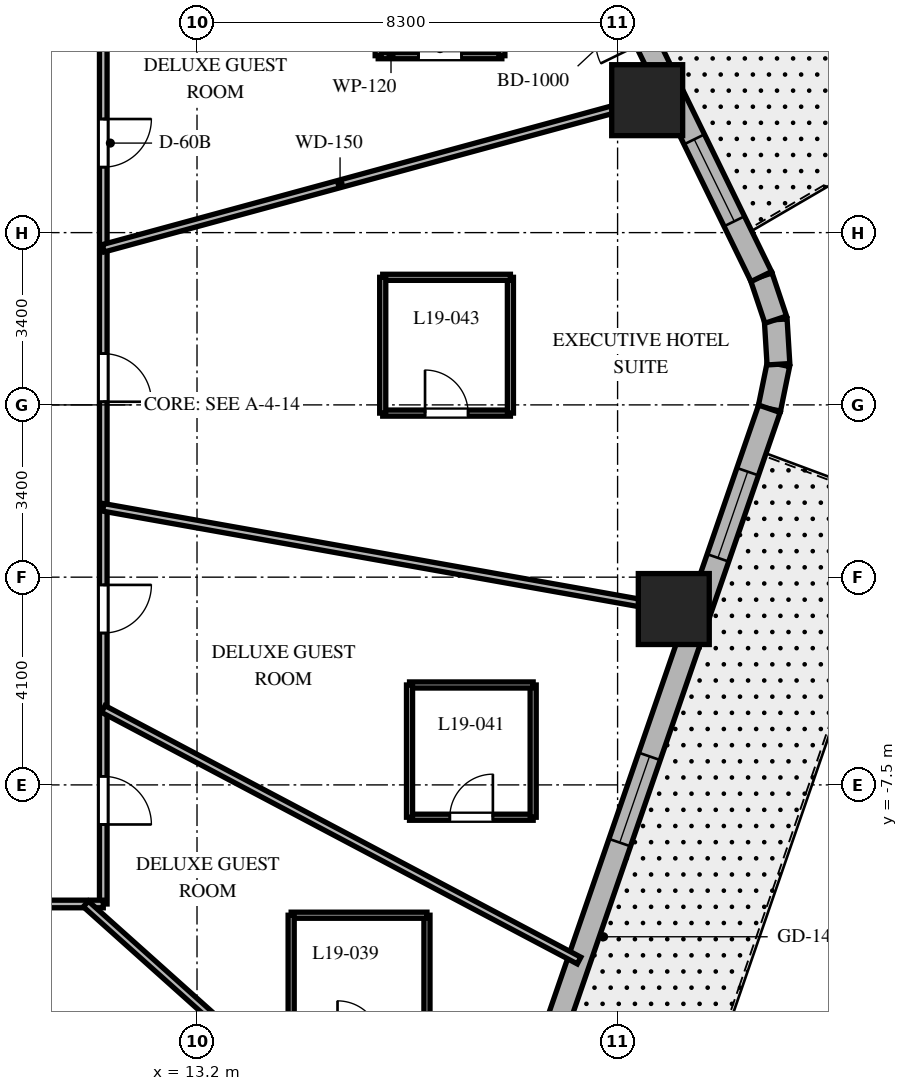
"""IFC4 building model, lengths in metres.
Left out: names, types, materials, properties, quantities, classifications, styles, units other than length and angle.
Written with IfcOpenShell. Run it as: python <this file> out.ifc"""

import sys

from ifc_helpers import new_model, si_unit, direction, frame, frame_2d, origin, origin_2d, place, context, subcontext, project, spatial, rectangle, extrude, element, fill, save


model = new_model("IFC4")
c1 = context("Model", 3, precision=1e-05, world=origin(), true_north=direction((0.0, 1.0)))
c2 = subcontext(c1, "Body", "Model", "MODEL_VIEW")
j1 = project(units=[si_unit("LENGTHUNIT", "METRE"), si_unit("PLANEANGLEUNIT", "RADIAN")], contexts=[c1])
p1 = place(None, origin())
s1 = spatial("IfcSite", under=j1, at=p1, CompositionType="ELEMENT")
p2 = place(p1, origin())
s2 = spatial("IfcBuilding", under=s1, at=p2, CompositionType="ELEMENT")
p3 = place(p2, frame((0.0, 0.0, 82.3)))
s3 = spatial("IfcBuildingStorey", under=s2, at=p3, CompositionType="ELEMENT", Elevation=82.3)
for number, where, z_axis, x_axis in (
    (1, (22.609, -4.029, 0.0), (0.0, 0.0, 1.0), (1.0, 0.0, 0.0)),
    (2, (22.084, 6.014, 0.0), (0.0, 0.0, 1.0), (1.0, 0.0, 0.0)),
):
    element("IfcColumn", number, at=place(p3, frame(where, z_axis=z_axis, x_axis=x_axis)), inside=s3, PredefinedType="COLUMN", context=c2, shape_type="SweptSolid", body=[
        extrude(rectangle(XDim=1.4, YDim=1.4, at=origin_2d()), origin(), (0.0, 0.0, 1.0), 3.7),
    ])
p4 = place(p3, frame((24.496, -0.077, 0.0), z_axis=(0.0, 0.0, 1.0), x_axis=(0.199570594521, 0.979883451132, 0.0)))
e3 = element("IfcWall", 3, at=p4, inside=s3, PredefinedType="SOLIDWALL", context=c2, shape_type="SweptSolid", body=[
    extrude(rectangle(XDim=0.897, YDim=0.45, at=frame_2d((0.448, 0.0))), origin(), (0.0, 0.0, 1.0), 3.38),
])
p5 = place(p3, frame((24.675, 0.802, 0.0), z_axis=(0.0, 0.0, 1.0), x_axis=(-0.061188874166, 0.998126205286, 0.0)))
e4 = element("IfcWall", 4, at=p5, inside=s3, PredefinedType="SOLIDWALL", context=c2, shape_type="SweptSolid", body=[
    extrude(rectangle(XDim=0.882, YDim=0.45, at=frame_2d((0.441, 0.0))), origin(), (0.0, 0.0, 1.0), 3.38),
])
p6 = place(p3, frame((24.621, 1.682, 0.0), z_axis=(0.0, 0.0, 1.0), x_axis=(-0.317697451681, 0.948192137278, 0.0)))
e5 = element("IfcWall", 5, at=p6, inside=s3, PredefinedType="SOLIDWALL", context=c2, shape_type="SweptSolid", body=[
    extrude(rectangle(XDim=0.897, YDim=0.45, at=frame_2d((0.448, 0.0))), origin(), (0.0, 0.0, 1.0), 3.38),
])
p7 = place(p3, frame((17.39, -20.678, 0.0), z_axis=(0.0, 0.0, 1.0), x_axis=(0.326068018294, 0.945346310854, 0.0)))
e6 = element("IfcWall", 6, at=p7, inside=s3, PredefinedType="SOLIDWALL", context=c2, shape_type="SweptSolid", body=[
    extrude(rectangle(XDim=21.793, YDim=0.45, at=frame_2d((10.896, 0.0))), origin(), (0.0, 0.0, 1.0), 3.38),
])
p8 = place(p7, frame((5.493, 0.0, 0.0)))
e7 = element("IfcOpeningElement", 7, at=p8, cuts=e6, PredefinedType="OPENING", context=c2, shape_type="SweptSolid", body=[
    extrude(rectangle(XDim=0.95, YDim=2.15, at=frame_2d((0.475, 1.075))), frame((0.0, 0.235, 0.0), z_axis=(0.0, -1.0, 0.0), x_axis=(1.0, 0.0, 0.0)), (0.0, 0.0, 1.0), 0.47),
])
p9 = place(p7, frame((1.26, 0.0, 0.8)))
e8 = element("IfcOpeningElement", 8, at=p9, cuts=e6, PredefinedType="OPENING", context=c2, shape_type="SweptSolid", body=[
    extrude(rectangle(XDim=1.8, YDim=1.8, at=frame_2d((0.9, 0.9))), frame((0.0, 0.235, 0.0), z_axis=(0.0, -1.0, 0.0), x_axis=(1.0, 0.0, 0.0)), (0.0, 0.0, 1.0), 0.47),
])
p10 = place(p7, frame((7.283, 0.0, 0.8)))
e9 = element("IfcOpeningElement", 9, at=p10, cuts=e6, PredefinedType="OPENING", context=c2, shape_type="SweptSolid", body=[
    extrude(rectangle(XDim=1.8, YDim=1.8, at=frame_2d((0.9, 0.9))), frame((0.0, 0.235, 0.0), z_axis=(0.0, -1.0, 0.0), x_axis=(1.0, 0.0, 0.0)), (0.0, 0.0, 1.0), 0.47),
])
p11 = place(p7, frame((12.736, 0.0, 0.8)))
e10 = element("IfcOpeningElement", 10, at=p11, cuts=e6, PredefinedType="OPENING", context=c2, shape_type="SweptSolid", body=[
    extrude(rectangle(XDim=1.8, YDim=1.8, at=frame_2d((0.9, 0.9))), frame((0.0, 0.235, 0.0), z_axis=(0.0, -1.0, 0.0), x_axis=(1.0, 0.0, 0.0)), (0.0, 0.0, 1.0), 0.47),
])
p12 = place(p7, frame((18.68, 0.0, 0.8)))
e11 = element("IfcOpeningElement", 11, at=p12, cuts=e6, PredefinedType="OPENING", context=c2, shape_type="SweptSolid", body=[
    extrude(rectangle(XDim=1.8, YDim=1.8, at=frame_2d((0.9, 0.9))), frame((0.0, 0.235, 0.0), z_axis=(0.0, -1.0, 0.0), x_axis=(1.0, 0.0, 0.0)), (0.0, 0.0, 1.0), 0.47),
])
p13 = place(p3, frame((24.336, 2.532, 0.0), z_axis=(0.0, 0.0, 1.0), x_axis=(-0.438931326393, 0.898520612291, 0.0)))
e12 = element("IfcWall", 12, at=p13, inside=s3, PredefinedType="SOLIDWALL", context=c2, shape_type="SweptSolid", body=[
    extrude(rectangle(XDim=20.623, YDim=0.45, at=frame_2d((10.312, 0.0))), origin(), (0.0, 0.0, 1.0), 3.38),
])
p14 = place(p13, frame((5.171, 0.0, 0.0)))
e13 = element("IfcOpeningElement", 13, at=p14, cuts=e12, PredefinedType="OPENING", context=c2, shape_type="SweptSolid", body=[
    extrude(rectangle(XDim=1.0, YDim=2.15, at=frame_2d((0.5, 1.075))), frame((0.0, 0.235, 0.0), z_axis=(0.0, -1.0, 0.0), x_axis=(1.0, 0.0, 0.0)), (0.0, 0.0, 1.0), 0.47),
])
p15 = place(p13, frame((6.842, 0.0, 0.8)))
e14 = element("IfcOpeningElement", 14, at=p15, cuts=e12, PredefinedType="OPENING", context=c2, shape_type="SweptSolid", body=[
    extrude(rectangle(XDim=1.8, YDim=1.8, at=frame_2d((0.9, 0.9))), frame((0.0, 0.235, 0.0), z_axis=(0.0, -1.0, 0.0), x_axis=(1.0, 0.0, 0.0)), (0.0, 0.0, 1.0), 0.47),
])
p16 = place(p13, frame((12.683, 0.0, 0.8)))
e15 = element("IfcOpeningElement", 15, at=p16, cuts=e12, PredefinedType="OPENING", context=c2, shape_type="SweptSolid", body=[
    extrude(rectangle(XDim=1.8, YDim=1.8, at=frame_2d((0.9, 0.9))), frame((0.0, 0.235, 0.0), z_axis=(0.0, -1.0, 0.0), x_axis=(1.0, 0.0, 0.0)), (0.0, 0.0, 1.0), 0.47),
])
p17 = place(p13, frame((17.66, 0.0, 0.8)))
e16 = element("IfcOpeningElement", 16, at=p17, cuts=e12, PredefinedType="OPENING", context=c2, shape_type="SweptSolid", body=[
    extrude(rectangle(XDim=1.8, YDim=1.8, at=frame_2d((0.9, 0.9))), frame((0.0, 0.235, 0.0), z_axis=(0.0, -1.0, 0.0), x_axis=(1.0, 0.0, 0.0)), (0.0, 0.0, 1.0), 0.47),
])
p18 = place(p13, frame((1.214, 0.0, 0.8)))
e17 = element("IfcOpeningElement", 17, at=p18, cuts=e12, PredefinedType="OPENING", context=c2, shape_type="SweptSolid", body=[
    extrude(rectangle(XDim=1.8, YDim=1.8, at=frame_2d((0.9, 0.9))), frame((0.0, 0.235, 0.0), z_axis=(0.0, -1.0, 0.0), x_axis=(1.0, 0.0, 0.0)), (0.0, 0.0, 1.0), 0.47),
])
p19 = place(p3, frame((11.35, 9.85, 0.0), z_axis=(0.0, 0.0, 1.0), x_axis=(0.0, -1.0, 0.0)))
e18 = element("IfcWall", 18, at=p19, inside=s3, PredefinedType="PARTITIONING", context=c2, shape_type="SweptSolid", body=[
    extrude(rectangle(XDim=19.7, YDim=0.15, at=frame_2d((9.85, 0.0))), origin(), (0.0, 0.0, 1.0), 2.82),
])
p20 = place(p19, frame((4.208, 0.0, 0.0)))
e19 = element("IfcOpeningElement", 19, at=p20, cuts=e18, PredefinedType="OPENING", context=c2, shape_type="SweptSolid", body=[
    extrude(rectangle(XDim=0.95, YDim=2.03, at=frame_2d((0.475, 1.015))), frame((0.0, 0.085, 0.0), z_axis=(0.0, -1.0, 0.0), x_axis=(1.0, 0.0, 0.0)), (0.0, 0.0, 1.0), 0.17),
])
p21 = place(p19, frame((0.97, 0.0, 0.0)))
e20 = element("IfcOpeningElement", 20, at=p21, cuts=e18, PredefinedType="OPENING", context=c2, shape_type="SweptSolid", body=[
    extrude(rectangle(XDim=0.95, YDim=2.03, at=frame_2d((0.475, 1.015))), frame((0.0, 0.085, 0.0), z_axis=(0.0, -1.0, 0.0), x_axis=(1.0, 0.0, 0.0)), (0.0, 0.0, 1.0), 0.17),
])
p22 = place(p19, frame((17.181, 0.0, 0.0)))
e21 = element("IfcOpeningElement", 21, at=p22, cuts=e18, PredefinedType="OPENING", context=c2, shape_type="SweptSolid", body=[
    extrude(rectangle(XDim=0.95, YDim=2.03, at=frame_2d((0.475, 1.015))), frame((0.0, 0.085, 0.0), z_axis=(0.0, -1.0, 0.0), x_axis=(1.0, 0.0, 0.0)), (0.0, 0.0, 1.0), 0.17),
])
p23 = place(p19, frame((13.403, 0.0, 0.0)))
e22 = element("IfcOpeningElement", 22, at=p23, cuts=e18, PredefinedType="OPENING", context=c2, shape_type="SweptSolid", body=[
    extrude(rectangle(XDim=0.95, YDim=2.03, at=frame_2d((0.475, 1.015))), frame((0.0, 0.085, 0.0), z_axis=(0.0, -1.0, 0.0), x_axis=(1.0, 0.0, 0.0)), (0.0, 0.0, 1.0), 0.17),
])
p24 = place(p19, frame((8.838, 0.0, 0.0)))
e23 = element("IfcOpeningElement", 23, at=p24, cuts=e18, PredefinedType="OPENING", context=c2, shape_type="SweptSolid", body=[
    extrude(rectangle(XDim=0.95, YDim=2.03, at=frame_2d((0.475, 1.015))), frame((0.0, 0.085, 0.0), z_axis=(0.0, -1.0, 0.0), x_axis=(1.0, 0.0, 0.0)), (0.0, 0.0, 1.0), 0.17),
])
p25 = place(p3, frame((11.35, -9.85, 0.0), z_axis=(0.0, 0.0, 1.0), x_axis=(-1.0, 0.0, 0.0)))
e24 = element("IfcWall", 24, at=p25, inside=s3, PredefinedType="PARTITIONING", context=c2, shape_type="SweptSolid", body=[
    extrude(rectangle(XDim=22.7, YDim=0.15, at=frame_2d((11.35, 0.0))), origin(), (0.0, 0.0, 1.0), 2.82),
])
p26 = place(p25, frame((18.837, 0.0, 0.0)))
e25 = element("IfcOpeningElement", 25, at=p26, cuts=e24, PredefinedType="OPENING", context=c2, shape_type="SweptSolid", body=[
    extrude(rectangle(XDim=0.9, YDim=2.03, at=frame_2d((0.45, 1.015))), frame((0.0, 0.085, 0.0), z_axis=(0.0, -1.0, 0.0), x_axis=(1.0, 0.0, 0.0)), (0.0, 0.0, 1.0), 0.17),
])
p27 = place(p25, frame((15.532, 0.0, 0.0)))
e26 = element("IfcOpeningElement", 26, at=p27, cuts=e24, PredefinedType="OPENING", context=c2, shape_type="SweptSolid", body=[
    extrude(rectangle(XDim=0.95, YDim=2.03, at=frame_2d((0.475, 1.015))), frame((0.0, 0.085, 0.0), z_axis=(0.0, -1.0, 0.0), x_axis=(1.0, 0.0, 0.0)), (0.0, 0.0, 1.0), 0.17),
])
p28 = place(p25, frame((10.444, 0.0, 0.0)))
e27 = element("IfcOpeningElement", 27, at=p28, cuts=e24, PredefinedType="OPENING", context=c2, shape_type="SweptSolid", body=[
    extrude(rectangle(XDim=0.95, YDim=2.03, at=frame_2d((0.475, 1.015))), frame((0.0, 0.085, 0.0), z_axis=(0.0, -1.0, 0.0), x_axis=(1.0, 0.0, 0.0)), (0.0, 0.0, 1.0), 0.17),
])
p29 = place(p25, frame((3.369, 0.0, 0.0)))
e28 = element("IfcOpeningElement", 28, at=p29, cuts=e24, PredefinedType="OPENING", context=c2, shape_type="SweptSolid", body=[
    extrude(rectangle(XDim=0.95, YDim=2.03, at=frame_2d((0.475, 1.015))), frame((0.0, 0.085, 0.0), z_axis=(0.0, -1.0, 0.0), x_axis=(1.0, 0.0, 0.0)), (0.0, 0.0, 1.0), 0.17),
])
p30 = place(p3, frame((11.35, 3.091, 0.0), z_axis=(0.0, 0.0, 1.0), x_axis=(0.964859685283, 0.262765651704, 0.0)))
e29 = element("IfcWall", 29, at=p30, inside=s3, PredefinedType="PARTITIONING", context=c2, shape_type="SweptSolid", body=[
    extrude(rectangle(XDim=11.629, YDim=0.15, at=frame_2d((5.814, 0.0))), origin(), (0.0, 0.0, 1.0), 2.52),
])
p31 = place(p3, frame((11.007, -9.85, 0.0), z_axis=(0.0, 0.0, 1.0), x_axis=(0.745177305978, -0.666866390407, 0.0)))
e30 = element("IfcWall", 30, at=p31, inside=s3, PredefinedType="PARTITIONING", context=c2, shape_type="SweptSolid", body=[
    extrude(rectangle(XDim=10.375, YDim=0.15, at=frame_2d((5.188, 0.0))), origin(), (0.0, 0.0, 1.0), 2.52),
])
p32 = place(p3, frame((11.35, -6.001, 0.0), z_axis=(0.0, 0.0, 1.0), x_axis=(0.884022077319, -0.467445148453, 0.0)))
e31 = element("IfcWall", 31, at=p32, inside=s3, PredefinedType="PARTITIONING", context=c2, shape_type="SweptSolid", body=[
    extrude(rectangle(XDim=10.621, YDim=0.15, at=frame_2d((5.311, 0.0))), origin(), (0.0, 0.0, 1.0), 2.52),
])
p33 = place(p3, frame((11.35, -2.023, 0.0), z_axis=(0.0, 0.0, 1.0), x_axis=(0.984493741877, -0.17541970301, 0.0)))
e32 = element("IfcWall", 32, at=p33, inside=s3, PredefinedType="PARTITIONING", context=c2, shape_type="SweptSolid", body=[
    extrude(rectangle(XDim=11.937, YDim=0.15, at=frame_2d((5.969, 0.0))), origin(), (0.0, 0.0, 1.0), 2.52),
])
p34 = place(p3, frame((16.776, 6.892, 0.0), z_axis=(0.0, 0.0, 1.0), x_axis=(1.0, 0.0, 0.0)))
e33 = element("IfcWall", 33, at=p34, inside=s3, PredefinedType="PARTITIONING", context=c2, shape_type="SweptSolid", body=[
    extrude(rectangle(XDim=2.44, YDim=0.12, at=frame_2d((1.22, 0.0))), origin(), (0.0, 0.0, 1.0), 2.906),
])
p35 = place(p34, frame((0.795, 0.0, 0.0)))
e34 = element("IfcOpeningElement", 34, at=p35, cuts=e33, PredefinedType="OPENING", context=c2, shape_type="SweptSolid", body=[
    extrude(rectangle(XDim=0.85, YDim=2.03, at=frame_2d((0.425, 1.015))), frame((0.0, 0.07, 0.0), z_axis=(0.0, -1.0, 0.0), x_axis=(1.0, 0.0, 0.0)), (0.0, 0.0, 1.0), 0.14),
])
p36 = place(p3, frame((19.216, 6.892, 0.0), z_axis=(0.0, 0.0, 1.0), x_axis=(0.0, 1.0, 0.0)))
e35 = element("IfcWall", 35, at=p36, inside=s3, PredefinedType="PARTITIONING", context=c2, shape_type="SweptSolid", body=[
    extrude(rectangle(XDim=2.61, YDim=0.12, at=frame_2d((1.305, 0.0))), origin(), (0.0, 0.0, 1.0), 3.38),
])
p37 = place(p3, frame((16.776, 9.502, 0.0), z_axis=(0.0, 0.0, 1.0), x_axis=(0.0, -1.0, 0.0)))
e36 = element("IfcWall", 36, at=p37, inside=s3, PredefinedType="PARTITIONING", context=c2, shape_type="SweptSolid", body=[
    extrude(rectangle(XDim=2.61, YDim=0.12, at=frame_2d((1.305, 0.0))), origin(), (0.0, 0.0, 1.0), 2.906),
])
p38 = place(p3, frame((17.738, -12.612, 0.0), z_axis=(0.0, 0.0, 1.0), x_axis=(0.0, 1.0, 0.0)))
e37 = element("IfcWall", 37, at=p38, inside=s3, PredefinedType="PARTITIONING", context=c2, shape_type="SweptSolid", body=[
    extrude(rectangle(XDim=2.54, YDim=0.12, at=frame_2d((1.27, 0.0))), origin(), (0.0, 0.0, 1.0), 3.38),
])
p39 = place(p3, frame((17.738, -10.072, 0.0), z_axis=(0.0, 0.0, 1.0), x_axis=(-1.0, 0.0, 0.0)))
e38 = element("IfcWall", 38, at=p39, inside=s3, PredefinedType="PARTITIONING", context=c2, shape_type="SweptSolid", body=[
    extrude(rectangle(XDim=2.68, YDim=0.12, at=frame_2d((1.34, 0.0))), origin(), (0.0, 0.0, 1.0), 2.952),
])
p40 = place(p3, frame((15.058, -10.072, 0.0), z_axis=(0.0, 0.0, 1.0), x_axis=(0.0, -1.0, 0.0)))
e39 = element("IfcWall", 39, at=p40, inside=s3, PredefinedType="PARTITIONING", context=c2, shape_type="SweptSolid", body=[
    extrude(rectangle(XDim=2.54, YDim=0.12, at=frame_2d((1.27, 0.0))), origin(), (0.0, 0.0, 1.0), 3.38),
])
p41 = place(p3, frame((17.394, -8.138, 0.0), z_axis=(0.0, 0.0, 1.0), x_axis=(1.0, 0.0, 0.0)))
e40 = element("IfcWall", 40, at=p41, inside=s3, PredefinedType="PARTITIONING", context=c2, shape_type="SweptSolid", body=[
    extrude(rectangle(XDim=2.44, YDim=0.12, at=frame_2d((1.22, 0.0))), origin(), (0.0, 0.0, 1.0), 3.38),
])
p42 = place(p41, frame((0.795, 0.0, 0.0)))
e41 = element("IfcOpeningElement", 41, at=p42, cuts=e40, PredefinedType="OPENING", context=c2, shape_type="SweptSolid", body=[
    extrude(rectangle(XDim=0.85, YDim=2.03, at=frame_2d((0.425, 1.015))), frame((0.0, 0.07, 0.0), z_axis=(0.0, -1.0, 0.0), x_axis=(1.0, 0.0, 0.0)), (0.0, 0.0, 1.0), 0.14),
])
p43 = place(p3, frame((19.834, -8.138, 0.0), z_axis=(0.0, 0.0, 1.0), x_axis=(0.0, 1.0, 0.0)))
e42 = element("IfcWall", 42, at=p43, inside=s3, PredefinedType="PARTITIONING", context=c2, shape_type="SweptSolid", body=[
    extrude(rectangle(XDim=2.61, YDim=0.12, at=frame_2d((1.305, 0.0))), origin(), (0.0, 0.0, 1.0), 3.38),
])
p44 = place(p3, frame((19.834, -5.528, 0.0), z_axis=(0.0, 0.0, 1.0), x_axis=(-1.0, 0.0, 0.0)))
e43 = element("IfcWall", 43, at=p44, inside=s3, PredefinedType="PARTITIONING", context=c2, shape_type="SweptSolid", body=[
    extrude(rectangle(XDim=2.44, YDim=0.12, at=frame_2d((1.22, 0.0))), origin(), (0.0, 0.0, 1.0), 2.82),
])
p45 = place(p3, frame((17.394, -5.528, 0.0), z_axis=(0.0, 0.0, 1.0), x_axis=(0.0, -1.0, 0.0)))
e44 = element("IfcWall", 44, at=p45, inside=s3, PredefinedType="PARTITIONING", context=c2, shape_type="SweptSolid", body=[
    extrude(rectangle(XDim=2.61, YDim=0.12, at=frame_2d((1.305, 0.0))), origin(), (0.0, 0.0, 1.0), 2.952),
])
p46 = place(p3, frame((16.865, -0.162, 0.0), z_axis=(0.0, 0.0, 1.0), x_axis=(1.0, 0.0, 0.0)))
e45 = element("IfcWall", 45, at=p46, inside=s3, PredefinedType="PARTITIONING", context=c2, shape_type="SweptSolid", body=[
    extrude(rectangle(XDim=2.52, YDim=0.12, at=frame_2d((1.26, 0.0))), origin(), (0.0, 0.0, 1.0), 2.82),
])
p47 = place(p46, frame((0.835, 0.0, 0.0)))
e46 = element("IfcOpeningElement", 46, at=p47, cuts=e45, PredefinedType="OPENING", context=c2, shape_type="SweptSolid", body=[
    extrude(rectangle(XDim=0.85, YDim=2.03, at=frame_2d((0.425, 1.015))), frame((0.0, 0.07, 0.0), z_axis=(0.0, -1.0, 0.0), x_axis=(1.0, 0.0, 0.0)), (0.0, 0.0, 1.0), 0.14),
])
p48 = place(p3, frame((19.385, -0.162, 0.0), z_axis=(0.0, 0.0, 1.0), x_axis=(0.0, 1.0, 0.0)))
e47 = element("IfcWall", 47, at=p48, inside=s3, PredefinedType="PARTITIONING", context=c2, shape_type="SweptSolid", body=[
    extrude(rectangle(XDim=2.68, YDim=0.12, at=frame_2d((1.34, 0.0))), origin(), (0.0, 0.0, 1.0), 3.38),
])
p49 = place(p3, frame((19.385, 2.518, 0.0), z_axis=(0.0, 0.0, 1.0), x_axis=(-1.0, 0.0, 0.0)))
e48 = element("IfcWall", 48, at=p49, inside=s3, PredefinedType="PARTITIONING", context=c2, shape_type="SweptSolid", body=[
    extrude(rectangle(XDim=2.52, YDim=0.12, at=frame_2d((1.26, 0.0))), origin(), (0.0, 0.0, 1.0), 2.82),
])
p50 = place(p3, frame((16.865, 2.518, 0.0), z_axis=(0.0, 0.0, 1.0), x_axis=(0.0, -1.0, 0.0)))
e49 = element("IfcWall", 49, at=p50, inside=s3, PredefinedType="PARTITIONING", context=c2, shape_type="SweptSolid", body=[
    extrude(rectangle(XDim=2.68, YDim=0.12, at=frame_2d((1.34, 0.0))), origin(), (0.0, 0.0, 1.0), 3.38),
])
p51 = place(p11, origin())
e50 = element("IfcWindow", 50, at=p51, inside=s3, PartitioningType="SINGLE_PANEL", PredefinedType="WINDOW", context=c2, shape_type="SweptSolid", body=[
    extrude(rectangle(XDim=1.8, YDim=1.8, at=frame_2d((0.9, 0.9))), frame((0.0, 0.03, 0.0), z_axis=(0.0, -1.0, 0.0), x_axis=(1.0, 0.0, 0.0)), (0.0, 0.0, 1.0), 0.06),
])
fill(e10, e50)
p52 = place(p12, origin())
e51 = element("IfcWindow", 51, at=p52, inside=s3, PartitioningType="SINGLE_PANEL", PredefinedType="WINDOW", context=c2, shape_type="SweptSolid", body=[
    extrude(rectangle(XDim=1.8, YDim=1.8, at=frame_2d((0.9, 0.9))), frame((0.0, 0.03, 0.0), z_axis=(0.0, -1.0, 0.0), x_axis=(1.0, 0.0, 0.0)), (0.0, 0.0, 1.0), 0.06),
])
fill(e11, e51)
p53 = place(p18, origin())
e52 = element("IfcWindow", 52, at=p53, inside=s3, PartitioningType="SINGLE_PANEL", PredefinedType="WINDOW", context=c2, shape_type="SweptSolid", body=[
    extrude(rectangle(XDim=1.8, YDim=1.8, at=frame_2d((0.9, 0.9))), frame((0.0, 0.03, 0.0), z_axis=(0.0, -1.0, 0.0), x_axis=(1.0, 0.0, 0.0)), (0.0, 0.0, 1.0), 0.06),
])
fill(e17, e52)
p54 = place(p20, origin())
e53 = element("IfcDoor", 53, at=p54, inside=s3, OperationType="SINGLE_SWING_LEFT", PredefinedType="DOOR", context=c2, shape_type="SweptSolid", body=[
    extrude(rectangle(XDim=0.95, YDim=2.03, at=frame_2d((0.475, 1.015))), frame((0.0, 0.025, 0.0), z_axis=(0.0, -1.0, 0.0), x_axis=(1.0, 0.0, 0.0)), (0.0, 0.0, 1.0), 0.05),
])
fill(e19, e53)
p55 = place(p35, origin())
e54 = element("IfcDoor", 54, at=p55, inside=s3, OperationType="SINGLE_SWING_RIGHT", PredefinedType="DOOR", context=c2, shape_type="SweptSolid", body=[
    extrude(rectangle(XDim=0.85, YDim=2.03, at=frame_2d((0.425, 1.015))), frame((0.0, 0.025, 0.0), z_axis=(0.0, -1.0, 0.0), x_axis=(1.0, 0.0, 0.0)), (0.0, 0.0, 1.0), 0.05),
])
fill(e34, e54)
p56 = place(p22, origin())
e55 = element("IfcDoor", 55, at=p56, inside=s3, OperationType="SINGLE_SWING_RIGHT", PredefinedType="DOOR", context=c2, shape_type="SweptSolid", body=[
    extrude(rectangle(XDim=0.95, YDim=2.03, at=frame_2d((0.475, 1.015))), frame((0.0, 0.025, 0.0), z_axis=(0.0, -1.0, 0.0), x_axis=(1.0, 0.0, 0.0)), (0.0, 0.0, 1.0), 0.05),
])
fill(e21, e55)
p57 = place(p23, origin())
e56 = element("IfcDoor", 56, at=p57, inside=s3, OperationType="SINGLE_SWING_LEFT", PredefinedType="DOOR", context=c2, shape_type="SweptSolid", body=[
    extrude(rectangle(XDim=0.95, YDim=2.03, at=frame_2d((0.475, 1.015))), frame((0.0, 0.025, 0.0), z_axis=(0.0, -1.0, 0.0), x_axis=(1.0, 0.0, 0.0)), (0.0, 0.0, 1.0), 0.05),
])
fill(e22, e56)
p58 = place(p42, origin())
e57 = element("IfcDoor", 57, at=p58, inside=s3, OperationType="SINGLE_SWING_RIGHT", PredefinedType="DOOR", context=c2, shape_type="SweptSolid", body=[
    extrude(rectangle(XDim=0.85, YDim=2.03, at=frame_2d((0.425, 1.015))), frame((0.0, 0.025, 0.0), z_axis=(0.0, -1.0, 0.0), x_axis=(1.0, 0.0, 0.0)), (0.0, 0.0, 1.0), 0.05),
])
fill(e41, e57)
p59 = place(p24, origin())
e58 = element("IfcDoor", 58, at=p59, inside=s3, OperationType="SINGLE_SWING_RIGHT", PredefinedType="DOOR", context=c2, shape_type="SweptSolid", body=[
    extrude(rectangle(XDim=0.95, YDim=2.03, at=frame_2d((0.475, 1.015))), frame((0.0, 0.025, 0.0), z_axis=(0.0, -1.0, 0.0), x_axis=(1.0, 0.0, 0.0)), (0.0, 0.0, 1.0), 0.05),
])
fill(e23, e58)
p60 = place(p47, origin())
e59 = element("IfcDoor", 59, at=p60, inside=s3, OperationType="SINGLE_SWING_LEFT", PredefinedType="DOOR", context=c2, shape_type="SweptSolid", body=[
    extrude(rectangle(XDim=0.85, YDim=2.03, at=frame_2d((0.425, 1.015))), frame((0.0, 0.025, 0.0), z_axis=(0.0, -1.0, 0.0), x_axis=(1.0, 0.0, 0.0)), (0.0, 0.0, 1.0), 0.05),
])
fill(e46, e59)
save(model, sys.argv[1])
